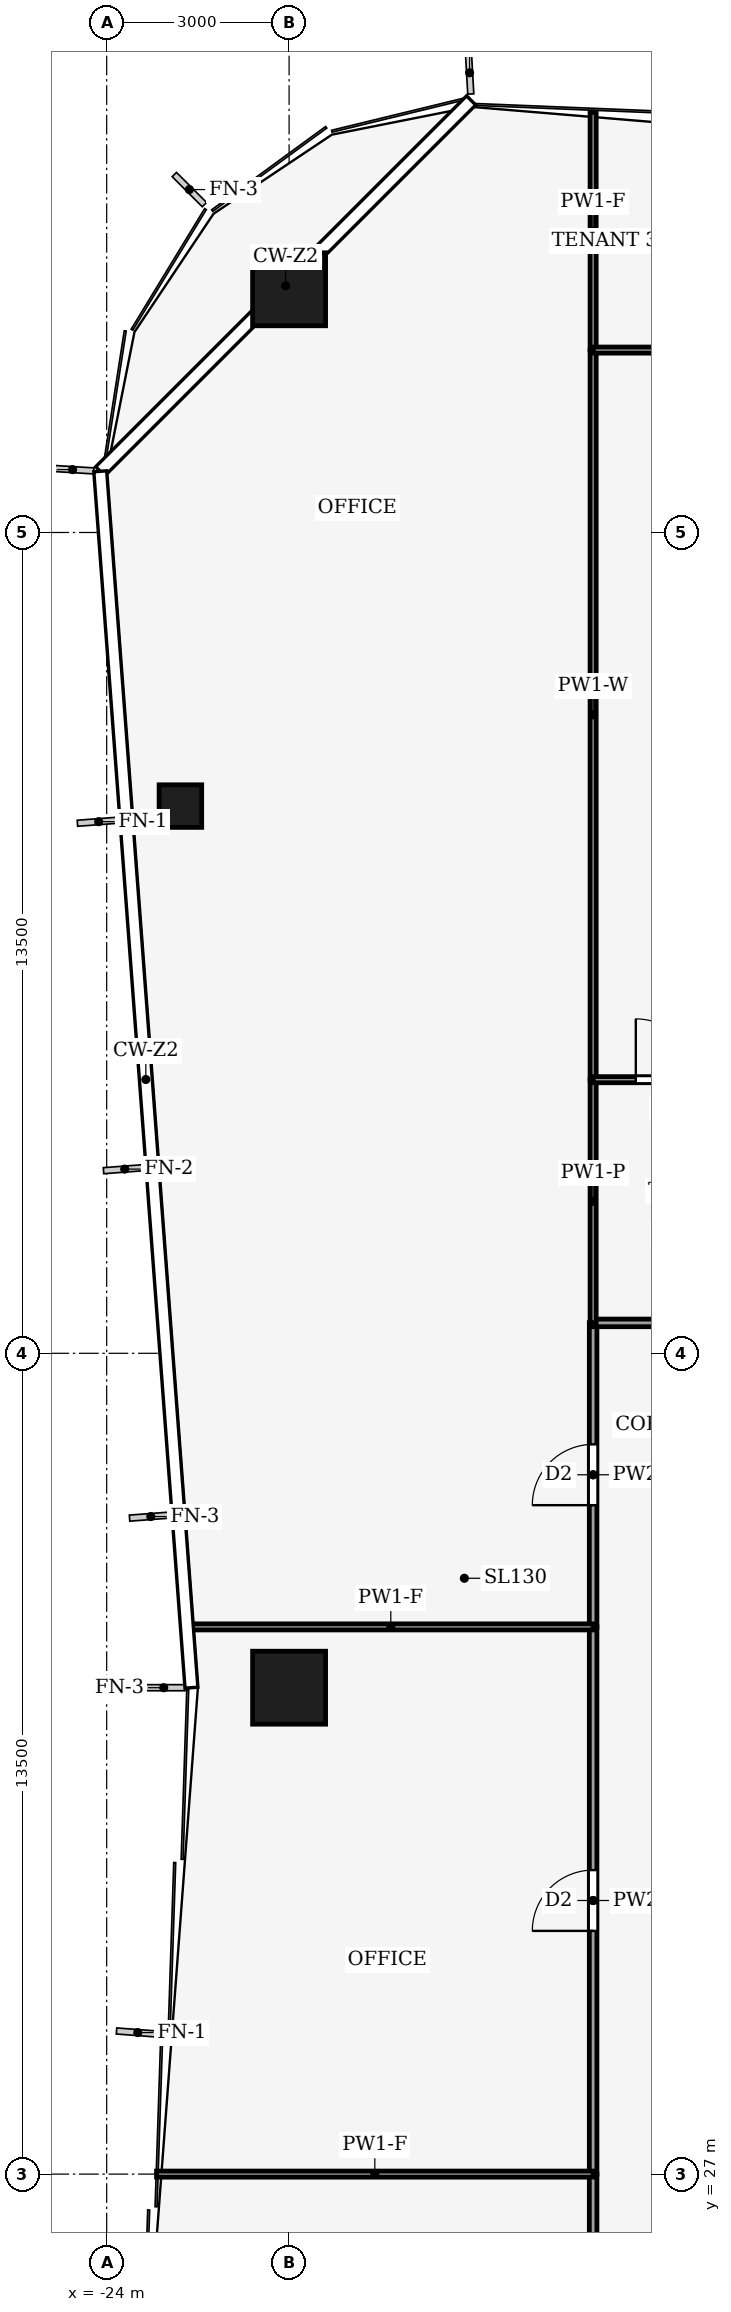
"""IFC4 building model, lengths in metres.
Left out: names, types, materials, properties, quantities, classifications, styles, units other than length and angle.
Written with IfcOpenShell. Run it as: python <this file> out.ifc"""

import sys

from ifc_helpers import new_model, si_unit, direction, frame, frame_2d, origin, origin_2d, place, context, subcontext, project, spatial, rectangle, hollow_rectangle, extrude, element, fill, save


model = new_model("IFC4")
c1 = context("Model", 3, precision=1e-05, world=origin(), true_north=direction((0.0, 1.0)))
c2 = subcontext(c1, "Body", "Model", "MODEL_VIEW")
j1 = project(units=[si_unit("LENGTHUNIT", "METRE"), si_unit("PLANEANGLEUNIT", "RADIAN")], contexts=[c1])
p1 = place(None, origin())
s1 = spatial("IfcSite", under=j1, at=p1, CompositionType="ELEMENT")
p2 = place(p1, origin())
s2 = spatial("IfcBuilding", under=s1, at=p2, CompositionType="ELEMENT")
p3 = place(p2, frame((0.0, 0.0, 162.0)))
s3 = spatial("IfcBuildingStorey", under=s2, at=p3, CompositionType="ELEMENT", Elevation=162.0)
for number, where, z_axis, x_axis in (
    (1, (-21.0, 58.0, 0.0), (0.0, 0.0, 1.0), (1.0, 0.0, 0.0)),
    (2, (-21.0, 35.0, 0.0), (0.0, 0.0, 1.0), (1.0, 0.0, 0.0)),
):
    element("IfcColumn", number, at=place(p3, frame(where, z_axis=z_axis, x_axis=x_axis)), inside=s3, PredefinedType="COLUMN", context=c2, shape_type="SweptSolid", body=[
        extrude(hollow_rectangle(XDim=1.2, YDim=1.2, WallThickness=0.07, at=origin_2d()), origin(), (0.0, 0.0, 1.0), 4.0),
    ])
p4 = place(p3, frame((-22.788, 49.5, 0.0), z_axis=(0.0, 0.0, 1.0), x_axis=(1.0, 0.0, 0.0)))
e3 = element("IfcColumn", 3, at=p4, inside=s3, PredefinedType="COLUMN", context=c2, shape_type="SweptSolid", body=[
    extrude(hollow_rectangle(XDim=0.7, YDim=0.7, WallThickness=0.03, at=origin_2d()), origin(), (0.0, 0.0, 1.0), 4.0),
])
p5 = place(p3, frame((-16.0, 24.0, 0.0), z_axis=(0.0, 0.0, 1.0), x_axis=(0.0, 1.0, 0.0)))
e4 = element("IfcWall", 4, at=p5, inside=s3, PredefinedType="PARTITIONING", context=c2, shape_type="SweptSolid", body=[
    extrude(rectangle(XDim=3.0, YDim=0.125, at=frame_2d((1.5, 0.0))), origin(), (0.0, 0.0, 1.0), 3.87),
])
p6 = place(p5, frame((1.05, 0.0, 0.0)))
e5 = element("IfcOpeningElement", 5, at=p6, cuts=e4, PredefinedType="OPENING", context=c2, shape_type="SweptSolid", body=[
    extrude(rectangle(XDim=0.9, YDim=2.1, at=frame_2d((0.45, 1.05))), frame((0.0, 0.073, 0.0), z_axis=(0.0, -1.0, 0.0), x_axis=(1.0, 0.0, 0.0)), (0.0, 0.0, 1.0), 0.145),
])
p7 = place(p3, frame((-16.0, 27.0, 0.0), z_axis=(0.0, 0.0, 1.0), x_axis=(0.0, 1.0, 0.0)))
e6 = element("IfcWall", 6, at=p7, inside=s3, PredefinedType="PARTITIONING", context=c2, shape_type="SweptSolid", body=[
    extrude(rectangle(XDim=9.0, YDim=0.125, at=frame_2d((4.5, 0.0))), origin(), (0.0, 0.0, 1.0), 3.48),
])
p8 = place(p7, frame((4.0, 0.0, 0.0)))
e7 = element("IfcOpeningElement", 7, at=p8, cuts=e6, PredefinedType="OPENING", context=c2, shape_type="SweptSolid", body=[
    extrude(rectangle(XDim=1.0, YDim=2.1, at=frame_2d((0.5, 1.05))), frame((0.0, 0.073, 0.0), z_axis=(0.0, -1.0, 0.0), x_axis=(1.0, 0.0, 0.0)), (0.0, 0.0, 1.0), 0.145),
])
p9 = place(p3, frame((-16.0, 36.0, 0.0), z_axis=(0.0, 0.0, 1.0), x_axis=(0.0, 1.0, 0.0)))
e8 = element("IfcWall", 8, at=p9, inside=s3, PredefinedType="PARTITIONING", context=c2, shape_type="SweptSolid", body=[
    extrude(rectangle(XDim=5.004, YDim=0.125, at=frame_2d((2.502, 0.0))), origin(), (0.0, 0.0, 1.0), 3.14),
])
p10 = place(p9, frame((2.002, 0.0, 0.0)))
e9 = element("IfcOpeningElement", 9, at=p10, cuts=e8, PredefinedType="OPENING", context=c2, shape_type="SweptSolid", body=[
    extrude(rectangle(XDim=1.0, YDim=2.1, at=frame_2d((0.5, 1.05))), frame((0.0, 0.073, 0.0), z_axis=(0.0, -1.0, 0.0), x_axis=(1.0, 0.0, 0.0)), (0.0, 0.0, 1.0), 0.145),
])
p11 = place(p3, frame((-16.0, 41.0, 0.0), z_axis=(0.0, 0.0, 1.0), x_axis=(1.0, 0.0, 0.0)))
e10 = element("IfcWall", 10, at=p11, inside=s3, PredefinedType="PARTITIONING", context=c2, shape_type="SweptSolid", body=[
    extrude(rectangle(XDim=4.0, YDim=0.125, at=frame_2d((2.0, 0.0))), origin(), (0.0, 0.0, 1.0), 3.44),
])
p12 = place(p11, frame((1.5, 0.0, 0.0)))
e11 = element("IfcOpeningElement", 11, at=p12, cuts=e10, PredefinedType="OPENING", context=c2, shape_type="SweptSolid", body=[
    extrude(rectangle(XDim=1.0, YDim=2.1, at=frame_2d((0.5, 1.05))), frame((0.0, 0.073, 0.0), z_axis=(0.0, -1.0, 0.0), x_axis=(1.0, 0.0, 0.0)), (0.0, 0.0, 1.0), 0.145),
])
p13 = place(p3, frame((-16.0, 27.0, 0.0), z_axis=(0.0, 0.0, 1.0), x_axis=(-1.0, 0.0, 0.0)))
e12 = element("IfcWall", 12, at=p13, inside=s3, PredefinedType="PARTITIONING", context=c2, shape_type="SweptSolid", body=[
    extrude(rectangle(XDim=7.18, YDim=0.1, at=frame_2d((3.59, 0.0))), origin(), (0.0, 0.0, 1.0), 3.04),
])
p14 = place(p3, frame((-16.0, 36.0, 0.0), z_axis=(0.0, 0.0, 1.0), x_axis=(-1.0, 0.0, 0.0)))
e13 = element("IfcWall", 13, at=p14, inside=s3, PredefinedType="PARTITIONING", context=c2, shape_type="SweptSolid", body=[
    extrude(rectangle(XDim=6.655, YDim=0.1, at=frame_2d((3.328, 0.0))), origin(), (0.0, 0.0, 1.0), 3.04),
])
p15 = place(p3, frame((-16.0, 41.0, 0.0), z_axis=(0.0, 0.0, 1.0), x_axis=(0.0, 1.0, 0.0)))
e14 = element("IfcWall", 14, at=p15, inside=s3, PredefinedType="PARTITIONING", context=c2, shape_type="SweptSolid", body=[
    extrude(rectangle(XDim=4.0, YDim=0.1, at=frame_2d((2.0, 0.0))), origin(), (0.0, 0.0, 1.0), 3.44),
])
p16 = place(p3, frame((-16.0, 45.0, 0.0), z_axis=(0.0, 0.0, 1.0), x_axis=(0.0, 1.0, 0.0)))
e15 = element("IfcWall", 15, at=p16, inside=s3, PredefinedType="PARTITIONING", context=c2, shape_type="SweptSolid", body=[
    extrude(rectangle(XDim=12.0, YDim=0.1, at=frame_2d((6.0, 0.0))), origin(), (0.0, 0.0, 1.0), 3.24),
])
p17 = place(p3, frame((-16.0, 57.0, 0.0), z_axis=(0.0, 0.0, 1.0), x_axis=(0.0, 1.0, 0.0)))
e16 = element("IfcWall", 16, at=p17, inside=s3, PredefinedType="PARTITIONING", context=c2, shape_type="SweptSolid", body=[
    extrude(rectangle(XDim=3.913, YDim=0.1, at=frame_2d((1.957, 0.0))), origin(), (0.0, 0.0, 1.0), 3.04),
])
p18 = place(p3, frame((-16.0, 45.0, 0.0), z_axis=(0.0, 0.0, 1.0), x_axis=(1.0, 0.0, 0.0)))
e17 = element("IfcWall", 17, at=p18, inside=s3, PredefinedType="PARTITIONING", context=c2, shape_type="SweptSolid", body=[
    extrude(rectangle(XDim=4.004, YDim=0.1, at=frame_2d((2.002, 0.0))), origin(), (0.0, 0.0, 1.0), 3.87),
])
p19 = place(p18, frame((0.702, 0.0, 0.0)))
e18 = element("IfcOpeningElement", 18, at=p19, cuts=e17, PredefinedType="OPENING", context=c2, shape_type="SweptSolid", body=[
    extrude(rectangle(XDim=1.0, YDim=2.1, at=frame_2d((0.5, 1.05))), frame((0.0, 0.06, 0.0), z_axis=(0.0, -1.0, 0.0), x_axis=(1.0, 0.0, 0.0)), (0.0, 0.0, 1.0), 0.12),
])
p20 = place(p3, frame((-16.0, 57.0, 0.0), z_axis=(0.0, 0.0, 1.0), x_axis=(1.0, 0.0, 0.0)))
e19 = element("IfcWall", 19, at=p20, inside=s3, PredefinedType="PARTITIONING", context=c2, shape_type="SweptSolid", body=[
    extrude(rectangle(XDim=13.0, YDim=0.1, at=frame_2d((6.5, 0.0))), origin(), (0.0, 0.0, 1.0), 3.44),
])
p21 = place(p20, frame((6.8, 0.0, 0.0)))
e20 = element("IfcOpeningElement", 20, at=p21, cuts=e19, PredefinedType="OPENING", context=c2, shape_type="SweptSolid", body=[
    extrude(rectangle(XDim=1.0, YDim=2.1, at=frame_2d((0.5, 1.05))), frame((0.0, 0.06, 0.0), z_axis=(0.0, -1.0, 0.0), x_axis=(1.0, 0.0, 0.0)), (0.0, 0.0, 1.0), 0.12),
])
p22 = place(p8, origin())
e21 = element("IfcDoor", 21, at=p22, inside=s3, OperationType="SINGLE_SWING_RIGHT", PredefinedType="DOOR", context=c2, shape_type="SweptSolid", body=[
    extrude(rectangle(XDim=1.0, YDim=2.1, at=frame_2d((0.5, 1.05))), frame((0.0, 0.025, 0.0), z_axis=(0.0, -1.0, 0.0), x_axis=(1.0, 0.0, 0.0)), (0.0, 0.0, 1.0), 0.05),
])
fill(e7, e21)
p23 = place(p10, origin())
e22 = element("IfcDoor", 22, at=p23, inside=s3, OperationType="SINGLE_SWING_LEFT", PredefinedType="DOOR", context=c2, shape_type="SweptSolid", body=[
    extrude(rectangle(XDim=1.0, YDim=2.1, at=frame_2d((0.5, 1.05))), frame((0.0, 0.025, 0.0), z_axis=(0.0, -1.0, 0.0), x_axis=(1.0, 0.0, 0.0)), (0.0, 0.0, 1.0), 0.05),
])
fill(e9, e22)
p24 = place(p19, origin())
e23 = element("IfcDoor", 23, at=p24, inside=s3, OperationType="SINGLE_SWING_LEFT", PredefinedType="DOOR", context=c2, shape_type="SweptSolid", body=[
    extrude(rectangle(XDim=1.0, YDim=2.1, at=frame_2d((0.5, 1.05))), frame((0.0, 0.025, 0.0), z_axis=(0.0, -1.0, 0.0), x_axis=(1.0, 0.0, 0.0)), (0.0, 0.0, 1.0), 0.05),
])
fill(e18, e23)
save(model, sys.argv[1])
